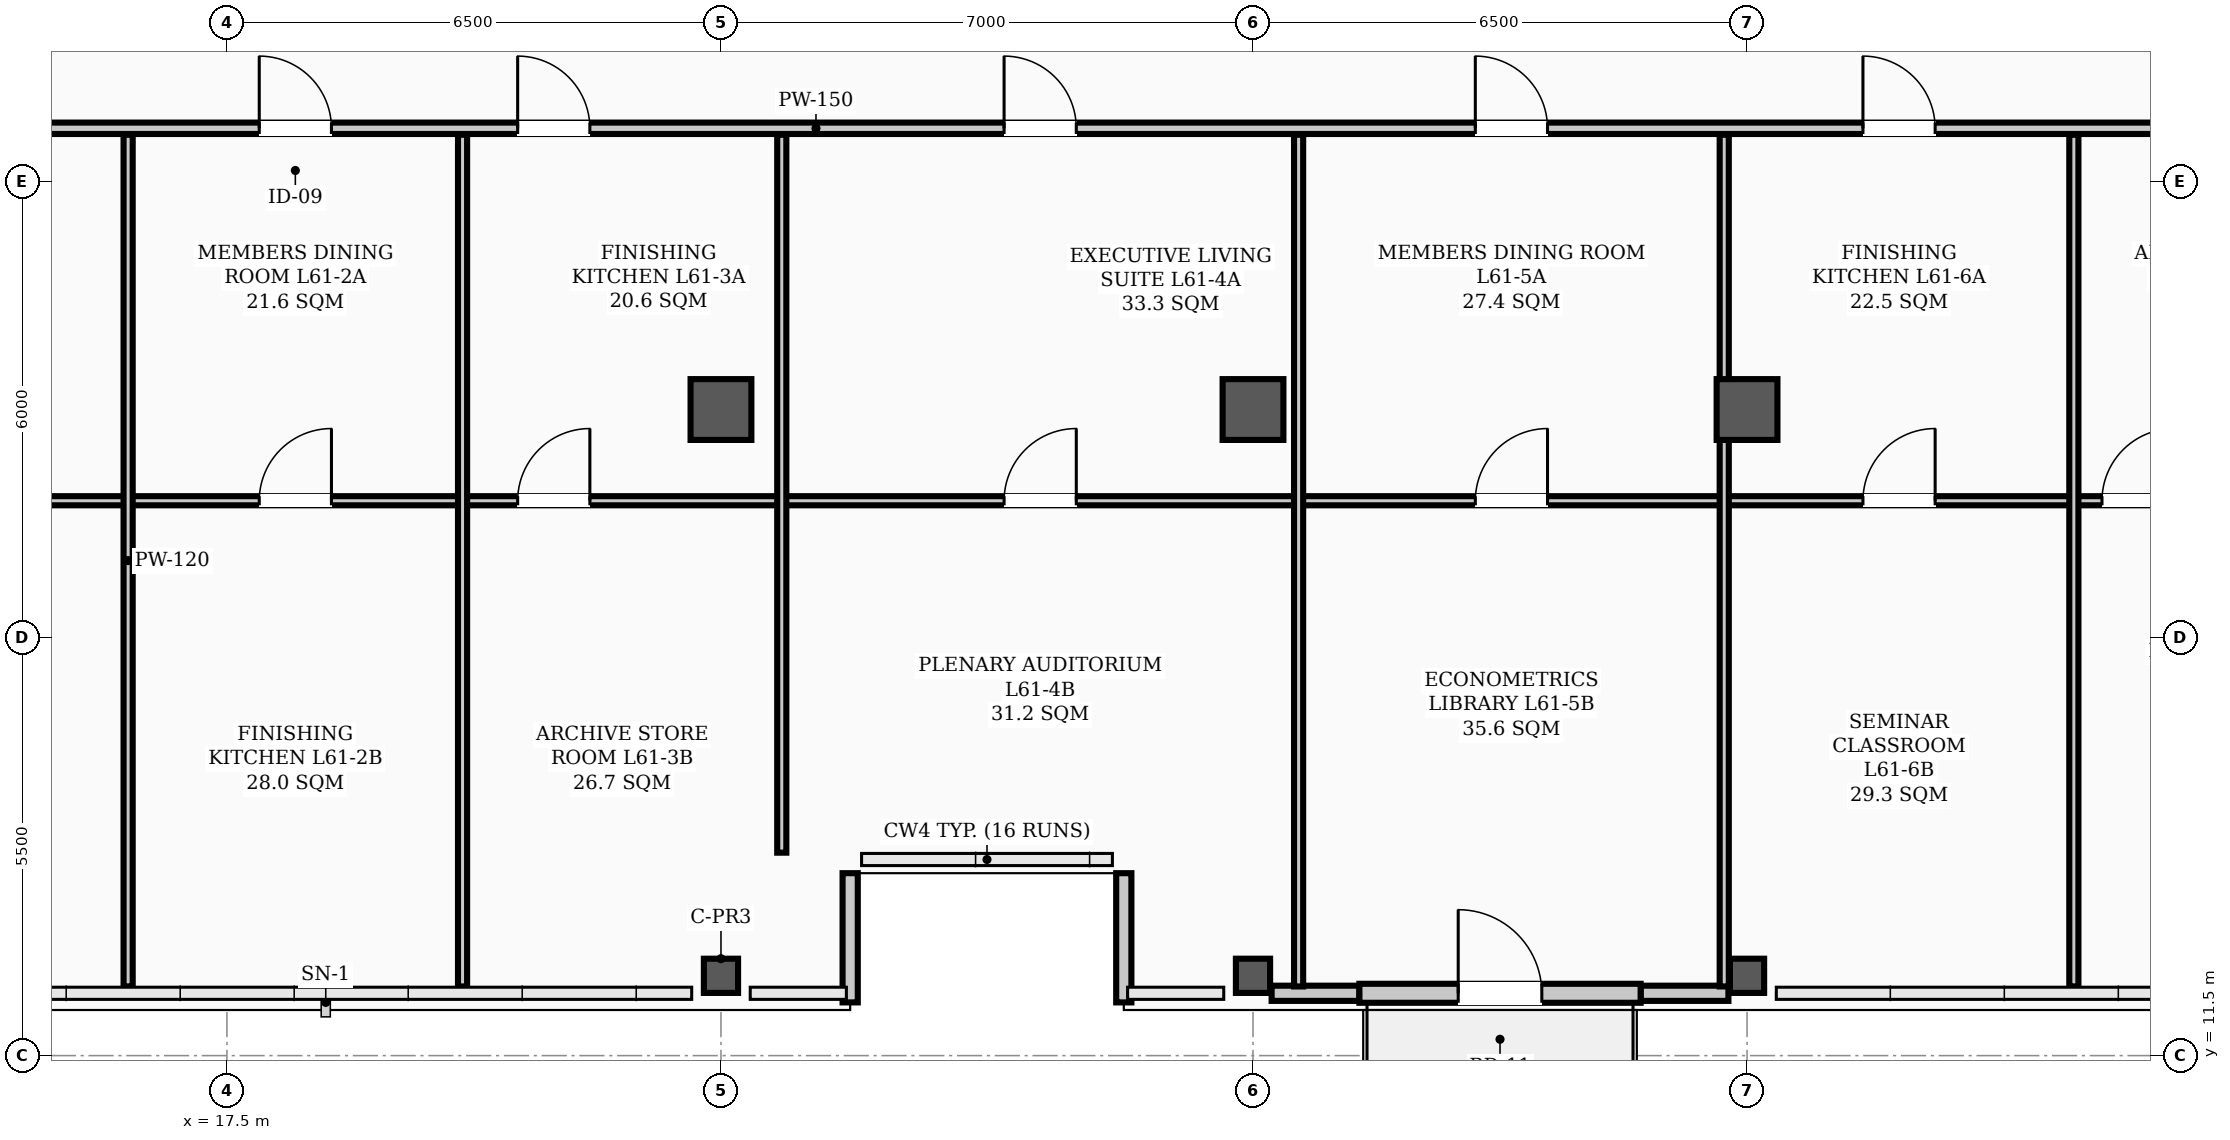
"""IFC4 building model, lengths in metres.
Left out: names, types, materials, properties, quantities, classifications, styles, units other than length and angle.
Written with IfcOpenShell. Run it as: python <this file> out.ifc"""

import sys

from ifc_helpers import new_model, si_unit, direction, frame, frame_2d, origin, origin_2d, place, context, subcontext, project, spatial, rectangle, hollow_rectangle, extrude, element, fill, save


model = new_model("IFC4")
c1 = context("Model", 3, precision=1e-05, world=origin(), true_north=direction((0.0, 1.0)))
c2 = subcontext(c1, "Body", "Model", "MODEL_VIEW")
j1 = project(units=[si_unit("LENGTHUNIT", "METRE"), si_unit("PLANEANGLEUNIT", "RADIAN")], contexts=[c1])
p1 = place(None, origin())
s1 = spatial("IfcSite", under=j1, at=p1, CompositionType="ELEMENT")
p2 = place(p1, origin())
s2 = spatial("IfcBuilding", under=s1, at=p2, CompositionType="ELEMENT")
p3 = place(p2, frame((0.0, 0.0, 246.2)))
s3 = spatial("IfcBuildingStorey", under=s2, at=p3, CompositionType="ELEMENT", Elevation=246.2)
for number, where, z_axis, x_axis in (
    (1, (24.0, 20.0, 0.0), (0.0, 0.0, 1.0), (1.0, 0.0, 0.0)),
    (2, (31.0, 20.0, 0.0), (0.0, 0.0, 1.0), (1.0, 0.0, 0.0)),
    (3, (37.5, 20.0, 0.0), (0.0, 0.0, 1.0), (1.0, 0.0, 0.0)),
):
    element("IfcColumn", number, at=place(p3, frame(where, z_axis=z_axis, x_axis=x_axis)), inside=s3, PredefinedType="COLUMN", context=c2, shape_type="SweptSolid", body=[
        extrude(hollow_rectangle(XDim=0.8, YDim=0.8, WallThickness=0.032, InnerFilletRadius=0.016, OuterFilletRadius=0.048, at=origin_2d()), origin(), (0.0, 0.0, 1.0), 3.9),
    ])
for number, where, z_axis, x_axis in (
    (4, (24.0, 12.55, 0.0), (0.0, 0.0, 1.0), (1.0, 0.0, 0.0)),
    (5, (31.0, 12.55, 0.0), (0.0, 0.0, 1.0), (1.0, 0.0, 0.0)),
    (6, (37.5, 12.55, 0.0), (0.0, 0.0, 1.0), (1.0, 0.0, 0.0)),
):
    element("IfcColumn", number, at=place(p3, frame(where, z_axis=z_axis, x_axis=x_axis)), inside=s3, PredefinedType="COLUMN", context=c2, shape_type="SweptSolid", body=[
        extrude(hollow_rectangle(XDim=0.45, YDim=0.45, WallThickness=0.022, InnerFilletRadius=0.022, OuterFilletRadius=0.044, at=origin_2d()), origin(), (0.0, 0.0, 1.0), 3.9),
    ])
for number, where, z_axis, x_axis in (
    (7, (31.245, 12.32, 0.0), (0.0, 0.0, 1.0), (1.0, 0.0, 0.0)),
    (8, (36.1, 12.32, 0.0), (0.0, 0.0, 1.0), (1.0, 0.0, 0.0)),
):
    element("IfcWall", number, at=place(p3, frame(where, z_axis=z_axis, x_axis=x_axis)), inside=s3, PredefinedType="PARAPET", context=c2, shape_type="SweptSolid", body=[
        extrude(rectangle(XDim=1.155, YDim=0.2, at=frame_2d((0.577, 0.0))), origin(), (0.0, 0.0, 1.0), 1.2),
    ])
for number, where, z_axis, x_axis in (
    (9, (25.7, 12.2, 0.0), (0.0, 0.0, 1.0), (0.0, 1.0, 0.0)),
    (10, (29.3, 13.9, 0.0), (0.0, 0.0, 1.0), (0.0, -1.0, 0.0)),
):
    element("IfcWall", number, at=place(p3, frame(where, z_axis=z_axis, x_axis=x_axis)), inside=s3, PredefinedType="PARAPET", context=c2, shape_type="SweptSolid", body=[
        extrude(rectangle(XDim=1.7, YDim=0.2, at=frame_2d((0.85, 0.0))), origin(), (0.0, 0.0, 1.0), 1.2),
    ])
p4 = place(p3, frame((32.4, 12.32, 0.0), z_axis=(0.0, 0.0, 1.0), x_axis=(1.0, 0.0, 0.0)))
e11 = element("IfcWall", 11, at=p4, inside=s3, PredefinedType="STANDARD", context=c2, shape_type="SweptSolid", body=[
    extrude(rectangle(XDim=3.7, YDim=0.25, at=frame_2d((1.85, 0.0))), origin(), (0.0, 0.0, 1.0), 3.18),
])
p5 = place(p4, frame((1.3, 0.0, 0.0)))
e12 = element("IfcOpeningElement", 12, at=p5, cuts=e11, PredefinedType="OPENING", context=c2, shape_type="SweptSolid", body=[
    extrude(rectangle(XDim=1.1, YDim=2.2, at=frame_2d((0.55, 1.1))), frame((0.0, 0.135, 0.0), z_axis=(0.0, -1.0, 0.0), x_axis=(1.0, 0.0, 0.0)), (0.0, 0.0, 1.0), 0.27),
])
p6 = place(p3, frame((4.81, 23.7, 0.0), z_axis=(0.0, 0.0, 1.0), x_axis=(1.0, 0.0, 0.0)))
e13 = element("IfcWall", 13, at=p6, inside=s3, PredefinedType="PARTITIONING", context=c2, shape_type="SweptSolid", body=[
    extrude(rectangle(XDim=40.88, YDim=0.15, at=frame_2d((20.44, 0.0))), origin(), (0.0, 0.0, 1.0), 3.2),
])
p7 = place(p6, frame((5.865, 0.0, 0.0)))
e14 = element("IfcOpeningElement", 14, at=p7, cuts=e13, PredefinedType="OPENING", context=c2, shape_type="SweptSolid", body=[
    extrude(rectangle(XDim=0.95, YDim=2.08, at=frame_2d((0.475, 1.04))), frame((0.0, 0.085, 0.0), z_axis=(0.0, -1.0, 0.0), x_axis=(1.0, 0.0, 0.0)), (0.0, 0.0, 1.0), 0.17),
])
p8 = place(p6, frame((13.115, 0.0, 0.0)))
e15 = element("IfcOpeningElement", 15, at=p8, cuts=e13, PredefinedType="OPENING", context=c2, shape_type="SweptSolid", body=[
    extrude(rectangle(XDim=0.95, YDim=2.08, at=frame_2d((0.475, 1.04))), frame((0.0, 0.085, 0.0), z_axis=(0.0, -1.0, 0.0), x_axis=(1.0, 0.0, 0.0)), (0.0, 0.0, 1.0), 0.17),
])
p9 = place(p6, frame((16.515, 0.0, 0.0)))
e16 = element("IfcOpeningElement", 16, at=p9, cuts=e13, PredefinedType="OPENING", context=c2, shape_type="SweptSolid", body=[
    extrude(rectangle(XDim=0.95, YDim=2.08, at=frame_2d((0.475, 1.04))), frame((0.0, 0.085, 0.0), z_axis=(0.0, -1.0, 0.0), x_axis=(1.0, 0.0, 0.0)), (0.0, 0.0, 1.0), 0.17),
])
p10 = place(p6, frame((22.915, 0.0, 0.0)))
e17 = element("IfcOpeningElement", 17, at=p10, cuts=e13, PredefinedType="OPENING", context=c2, shape_type="SweptSolid", body=[
    extrude(rectangle(XDim=0.95, YDim=2.08, at=frame_2d((0.475, 1.04))), frame((0.0, 0.085, 0.0), z_axis=(0.0, -1.0, 0.0), x_axis=(1.0, 0.0, 0.0)), (0.0, 0.0, 1.0), 0.17),
])
p11 = place(p6, frame((29.115, 0.0, 0.0)))
e18 = element("IfcOpeningElement", 18, at=p11, cuts=e13, PredefinedType="OPENING", context=c2, shape_type="SweptSolid", body=[
    extrude(rectangle(XDim=0.95, YDim=2.08, at=frame_2d((0.475, 1.04))), frame((0.0, 0.085, 0.0), z_axis=(0.0, -1.0, 0.0), x_axis=(1.0, 0.0, 0.0)), (0.0, 0.0, 1.0), 0.17),
])
p12 = place(p6, frame((34.215, 0.0, 0.0)))
e19 = element("IfcOpeningElement", 19, at=p12, cuts=e13, PredefinedType="OPENING", context=c2, shape_type="SweptSolid", body=[
    extrude(rectangle(XDim=0.95, YDim=2.08, at=frame_2d((0.475, 1.04))), frame((0.0, 0.085, 0.0), z_axis=(0.0, -1.0, 0.0), x_axis=(1.0, 0.0, 0.0)), (0.0, 0.0, 1.0), 0.17),
])
p13 = place(p6, frame((38.46, 0.0, 0.0)))
e20 = element("IfcOpeningElement", 20, at=p13, cuts=e13, PredefinedType="OPENING", context=c2, shape_type="SweptSolid", body=[
    extrude(rectangle(XDim=0.95, YDim=2.08, at=frame_2d((0.475, 1.04))), frame((0.0, 0.085, 0.0), z_axis=(0.0, -1.0, 0.0), x_axis=(1.0, 0.0, 0.0)), (0.0, 0.0, 1.0), 0.17),
])
p14 = place(p3, frame((4.81, 18.8, 0.0), z_axis=(0.0, 0.0, 1.0), x_axis=(1.0, 0.0, 0.0)))
e21 = element("IfcWall", 21, at=p14, inside=s3, PredefinedType="PARTITIONING", context=c2, shape_type="SweptSolid", body=[
    extrude(rectangle(XDim=11.39, YDim=0.12, at=frame_2d((5.695, 0.0))), origin(), (0.0, 0.0, 1.0), 3.2),
])
p15 = place(p14, frame((5.22, 0.0, 0.0)))
e22 = element("IfcOpeningElement", 22, at=p15, cuts=e21, PredefinedType="OPENING", context=c2, shape_type="SweptSolid", body=[
    extrude(rectangle(XDim=0.95, YDim=2.08, at=frame_2d((0.475, 1.04))), frame((0.0, 0.07, 0.0), z_axis=(0.0, -1.0, 0.0), x_axis=(1.0, 0.0, 0.0)), (0.0, 0.0, 1.0), 0.14),
])
p16 = place(p3, frame((16.2, 18.8, 0.0), z_axis=(0.0, 0.0, 1.0), x_axis=(1.0, 0.0, 0.0)))
e23 = element("IfcWall", 23, at=p16, inside=s3, PredefinedType="PARTITIONING", context=c2, shape_type="SweptSolid", body=[
    extrude(rectangle(XDim=4.4, YDim=0.12, at=frame_2d((2.2, 0.0))), origin(), (0.0, 0.0, 1.0), 3.35),
])
p17 = place(p16, frame((1.725, 0.0, 0.0)))
e24 = element("IfcOpeningElement", 24, at=p17, cuts=e23, PredefinedType="OPENING", context=c2, shape_type="SweptSolid", body=[
    extrude(rectangle(XDim=0.95, YDim=2.08, at=frame_2d((0.475, 1.04))), frame((0.0, 0.07, 0.0), z_axis=(0.0, -1.0, 0.0), x_axis=(1.0, 0.0, 0.0)), (0.0, 0.0, 1.0), 0.14),
])
p18 = place(p3, frame((20.6, 18.8, 0.0), z_axis=(0.0, 0.0, 1.0), x_axis=(1.0, 0.0, 0.0)))
e25 = element("IfcWall", 25, at=p18, inside=s3, PredefinedType="PARTITIONING", context=c2, shape_type="SweptSolid", body=[
    extrude(rectangle(XDim=4.2, YDim=0.12, at=frame_2d((2.1, 0.0))), origin(), (0.0, 0.0, 1.0), 3.2),
])
p19 = place(p18, frame((0.725, 0.0, 0.0)))
e26 = element("IfcOpeningElement", 26, at=p19, cuts=e25, PredefinedType="OPENING", context=c2, shape_type="SweptSolid", body=[
    extrude(rectangle(XDim=0.95, YDim=2.08, at=frame_2d((0.475, 1.04))), frame((0.0, 0.07, 0.0), z_axis=(0.0, -1.0, 0.0), x_axis=(1.0, 0.0, 0.0)), (0.0, 0.0, 1.0), 0.14),
])
p20 = place(p3, frame((24.8, 18.8, 0.0), z_axis=(0.0, 0.0, 1.0), x_axis=(1.0, 0.0, 0.0)))
e27 = element("IfcWall", 27, at=p20, inside=s3, PredefinedType="PARTITIONING", context=c2, shape_type="SweptSolid", body=[
    extrude(rectangle(XDim=6.8, YDim=0.12, at=frame_2d((3.4, 0.0))), origin(), (0.0, 0.0, 1.0), 3.2),
])
p21 = place(p20, frame((2.925, 0.0, 0.0)))
e28 = element("IfcOpeningElement", 28, at=p21, cuts=e27, PredefinedType="OPENING", context=c2, shape_type="SweptSolid", body=[
    extrude(rectangle(XDim=0.95, YDim=2.08, at=frame_2d((0.475, 1.04))), frame((0.0, 0.07, 0.0), z_axis=(0.0, -1.0, 0.0), x_axis=(1.0, 0.0, 0.0)), (0.0, 0.0, 1.0), 0.14),
])
p22 = place(p3, frame((31.6, 18.8, 0.0), z_axis=(0.0, 0.0, 1.0), x_axis=(1.0, 0.0, 0.0)))
e29 = element("IfcWall", 29, at=p22, inside=s3, PredefinedType="PARTITIONING", context=c2, shape_type="SweptSolid", body=[
    extrude(rectangle(XDim=5.6, YDim=0.12, at=frame_2d((2.8, 0.0))), origin(), (0.0, 0.0, 1.0), 3.2),
])
p23 = place(p22, frame((2.325, 0.0, 0.0)))
e30 = element("IfcOpeningElement", 30, at=p23, cuts=e29, PredefinedType="OPENING", context=c2, shape_type="SweptSolid", body=[
    extrude(rectangle(XDim=0.95, YDim=2.08, at=frame_2d((0.475, 1.04))), frame((0.0, 0.07, 0.0), z_axis=(0.0, -1.0, 0.0), x_axis=(1.0, 0.0, 0.0)), (0.0, 0.0, 1.0), 0.14),
])
p24 = place(p3, frame((37.2, 18.8, 0.0), z_axis=(0.0, 0.0, 1.0), x_axis=(1.0, 0.0, 0.0)))
e31 = element("IfcWall", 31, at=p24, inside=s3, PredefinedType="PARTITIONING", context=c2, shape_type="SweptSolid", body=[
    extrude(rectangle(XDim=4.6, YDim=0.12, at=frame_2d((2.3, 0.0))), origin(), (0.0, 0.0, 1.0), 3.2),
])
p25 = place(p24, frame((1.825, 0.0, 0.0)))
e32 = element("IfcOpeningElement", 32, at=p25, cuts=e31, PredefinedType="OPENING", context=c2, shape_type="SweptSolid", body=[
    extrude(rectangle(XDim=0.95, YDim=2.08, at=frame_2d((0.475, 1.04))), frame((0.0, 0.07, 0.0), z_axis=(0.0, -1.0, 0.0), x_axis=(1.0, 0.0, 0.0)), (0.0, 0.0, 1.0), 0.14),
])
p26 = place(p3, frame((41.8, 18.8, 0.0), z_axis=(0.0, 0.0, 1.0), x_axis=(1.0, 0.0, 0.0)))
e33 = element("IfcWall", 33, at=p26, inside=s3, PredefinedType="PARTITIONING", context=c2, shape_type="SweptSolid", body=[
    extrude(rectangle(XDim=3.89, YDim=0.12, at=frame_2d((1.945, 0.0))), origin(), (0.0, 0.0, 1.0), 3.72),
])
p27 = place(p26, frame((0.37, 0.0, 0.0)))
e34 = element("IfcOpeningElement", 34, at=p27, cuts=e33, PredefinedType="OPENING", context=c2, shape_type="SweptSolid", body=[
    extrude(rectangle(XDim=0.95, YDim=2.08, at=frame_2d((0.475, 1.04))), frame((0.0, 0.07, 0.0), z_axis=(0.0, -1.0, 0.0), x_axis=(1.0, 0.0, 0.0)), (0.0, 0.0, 1.0), 0.14),
])
for number, where, z_axis, x_axis in (
    (35, (16.2, 12.41, 0.0), (0.0, 0.0, 1.0), (0.0, 1.0, 0.0)),
    (36, (20.6, 12.41, 0.0), (0.0, 0.0, 1.0), (0.0, 1.0, 0.0)),
):
    element("IfcWall", number, at=place(p3, frame(where, z_axis=z_axis, x_axis=x_axis)), inside=s3, PredefinedType="PARTITIONING", context=c2, shape_type="SweptSolid", body=[
        extrude(rectangle(XDim=11.205, YDim=0.12, at=frame_2d((5.603, 0.0))), origin(), (0.0, 0.0, 1.0), 3.1),
    ])
p28 = place(p3, frame((24.8, 14.17, 0.0), z_axis=(0.0, 0.0, 1.0), x_axis=(0.0, 1.0, 0.0)))
e37 = element("IfcWall", 37, at=p28, inside=s3, PredefinedType="PARTITIONING", context=c2, shape_type="SweptSolid", body=[
    extrude(rectangle(XDim=9.445, YDim=0.12, at=frame_2d((4.723, 0.0))), origin(), (0.0, 0.0, 1.0), 3.1),
])
for number, where, z_axis, x_axis in (
    (38, (31.6, 12.41, 0.0), (0.0, 0.0, 1.0), (0.0, 1.0, 0.0)),
    (39, (37.2, 12.41, 0.0), (0.0, 0.0, 1.0), (0.0, 1.0, 0.0)),
):
    element("IfcWall", number, at=place(p3, frame(where, z_axis=z_axis, x_axis=x_axis)), inside=s3, PredefinedType="PARTITIONING", context=c2, shape_type="SweptSolid", body=[
        extrude(rectangle(XDim=11.205, YDim=0.12, at=frame_2d((5.603, 0.0))), origin(), (0.0, 0.0, 1.0), 3.1),
    ])
p29 = place(p3, frame((41.8, 12.41, 0.0), z_axis=(0.0, 0.0, 1.0), x_axis=(0.0, 1.0, 0.0)))
e40 = element("IfcWall", 40, at=p29, inside=s3, PredefinedType="PARTITIONING", context=c2, shape_type="SweptSolid", body=[
    extrude(rectangle(XDim=11.205, YDim=0.12, at=frame_2d((5.603, 0.0))), origin(), (0.0, 0.0, 1.0), 3.72),
])
p30 = place(p5, origin())
e41 = element("IfcDoor", 41, at=p30, inside=s3, OperationType="SINGLE_SWING_LEFT", PredefinedType="DOOR", context=c2, shape_type="SweptSolid", body=[
    extrude(rectangle(XDim=1.1, YDim=2.2, at=frame_2d((0.55, 1.1))), frame((0.0, 0.025, 0.0), z_axis=(0.0, -1.0, 0.0), x_axis=(1.0, 0.0, 0.0)), (0.0, 0.0, 1.0), 0.05),
])
fill(e12, e41)
p31 = place(p17, origin())
e42 = element("IfcDoor", 42, at=p31, inside=s3, OperationType="SINGLE_SWING_RIGHT", PredefinedType="DOOR", context=c2, shape_type="SweptSolid", body=[
    extrude(rectangle(XDim=0.95, YDim=2.08, at=frame_2d((0.475, 1.04))), frame((0.0, 0.025, 0.0), z_axis=(0.0, -1.0, 0.0), x_axis=(1.0, 0.0, 0.0)), (0.0, 0.0, 1.0), 0.05),
])
fill(e24, e42)
p32 = place(p8, origin())
e43 = element("IfcDoor", 43, at=p32, inside=s3, OperationType="SINGLE_SWING_LEFT", PredefinedType="DOOR", context=c2, shape_type="SweptSolid", body=[
    extrude(rectangle(XDim=0.95, YDim=2.08, at=frame_2d((0.475, 1.04))), frame((0.0, 0.025, 0.0), z_axis=(0.0, -1.0, 0.0), x_axis=(1.0, 0.0, 0.0)), (0.0, 0.0, 1.0), 0.05),
])
fill(e15, e43)
p33 = place(p19, origin())
e44 = element("IfcDoor", 44, at=p33, inside=s3, OperationType="SINGLE_SWING_RIGHT", PredefinedType="DOOR", context=c2, shape_type="SweptSolid", body=[
    extrude(rectangle(XDim=0.95, YDim=2.08, at=frame_2d((0.475, 1.04))), frame((0.0, 0.025, 0.0), z_axis=(0.0, -1.0, 0.0), x_axis=(1.0, 0.0, 0.0)), (0.0, 0.0, 1.0), 0.05),
])
fill(e26, e44)
p34 = place(p9, origin())
e45 = element("IfcDoor", 45, at=p34, inside=s3, OperationType="SINGLE_SWING_LEFT", PredefinedType="DOOR", context=c2, shape_type="SweptSolid", body=[
    extrude(rectangle(XDim=0.95, YDim=2.08, at=frame_2d((0.475, 1.04))), frame((0.0, 0.025, 0.0), z_axis=(0.0, -1.0, 0.0), x_axis=(1.0, 0.0, 0.0)), (0.0, 0.0, 1.0), 0.05),
])
fill(e16, e45)
p35 = place(p21, origin())
e46 = element("IfcDoor", 46, at=p35, inside=s3, OperationType="SINGLE_SWING_RIGHT", PredefinedType="DOOR", context=c2, shape_type="SweptSolid", body=[
    extrude(rectangle(XDim=0.95, YDim=2.08, at=frame_2d((0.475, 1.04))), frame((0.0, 0.025, 0.0), z_axis=(0.0, -1.0, 0.0), x_axis=(1.0, 0.0, 0.0)), (0.0, 0.0, 1.0), 0.05),
])
fill(e28, e46)
p36 = place(p10, origin())
e47 = element("IfcDoor", 47, at=p36, inside=s3, OperationType="SINGLE_SWING_LEFT", PredefinedType="DOOR", context=c2, shape_type="SweptSolid", body=[
    extrude(rectangle(XDim=0.95, YDim=2.08, at=frame_2d((0.475, 1.04))), frame((0.0, 0.025, 0.0), z_axis=(0.0, -1.0, 0.0), x_axis=(1.0, 0.0, 0.0)), (0.0, 0.0, 1.0), 0.05),
])
fill(e17, e47)
p37 = place(p23, origin())
e48 = element("IfcDoor", 48, at=p37, inside=s3, OperationType="SINGLE_SWING_RIGHT", PredefinedType="DOOR", context=c2, shape_type="SweptSolid", body=[
    extrude(rectangle(XDim=0.95, YDim=2.08, at=frame_2d((0.475, 1.04))), frame((0.0, 0.025, 0.0), z_axis=(0.0, -1.0, 0.0), x_axis=(1.0, 0.0, 0.0)), (0.0, 0.0, 1.0), 0.05),
])
fill(e30, e48)
p38 = place(p11, origin())
e49 = element("IfcDoor", 49, at=p38, inside=s3, OperationType="SINGLE_SWING_LEFT", PredefinedType="DOOR", context=c2, shape_type="SweptSolid", body=[
    extrude(rectangle(XDim=0.95, YDim=2.08, at=frame_2d((0.475, 1.04))), frame((0.0, 0.025, 0.0), z_axis=(0.0, -1.0, 0.0), x_axis=(1.0, 0.0, 0.0)), (0.0, 0.0, 1.0), 0.05),
])
fill(e18, e49)
p39 = place(p25, origin())
e50 = element("IfcDoor", 50, at=p39, inside=s3, OperationType="SINGLE_SWING_RIGHT", PredefinedType="DOOR", context=c2, shape_type="SweptSolid", body=[
    extrude(rectangle(XDim=0.95, YDim=2.08, at=frame_2d((0.475, 1.04))), frame((0.0, 0.025, 0.0), z_axis=(0.0, -1.0, 0.0), x_axis=(1.0, 0.0, 0.0)), (0.0, 0.0, 1.0), 0.05),
])
fill(e32, e50)
p40 = place(p12, origin())
e51 = element("IfcDoor", 51, at=p40, inside=s3, OperationType="SINGLE_SWING_LEFT", PredefinedType="DOOR", context=c2, shape_type="SweptSolid", body=[
    extrude(rectangle(XDim=0.95, YDim=2.08, at=frame_2d((0.475, 1.04))), frame((0.0, 0.025, 0.0), z_axis=(0.0, -1.0, 0.0), x_axis=(1.0, 0.0, 0.0)), (0.0, 0.0, 1.0), 0.05),
])
fill(e19, e51)
p41 = place(p27, origin())
e52 = element("IfcDoor", 52, at=p41, inside=s3, OperationType="SINGLE_SWING_RIGHT", PredefinedType="DOOR", context=c2, shape_type="SweptSolid", body=[
    extrude(rectangle(XDim=0.95, YDim=2.08, at=frame_2d((0.475, 1.04))), frame((0.0, 0.025, 0.0), z_axis=(0.0, -1.0, 0.0), x_axis=(1.0, 0.0, 0.0)), (0.0, 0.0, 1.0), 0.05),
])
fill(e34, e52)
save(model, sys.argv[1])
